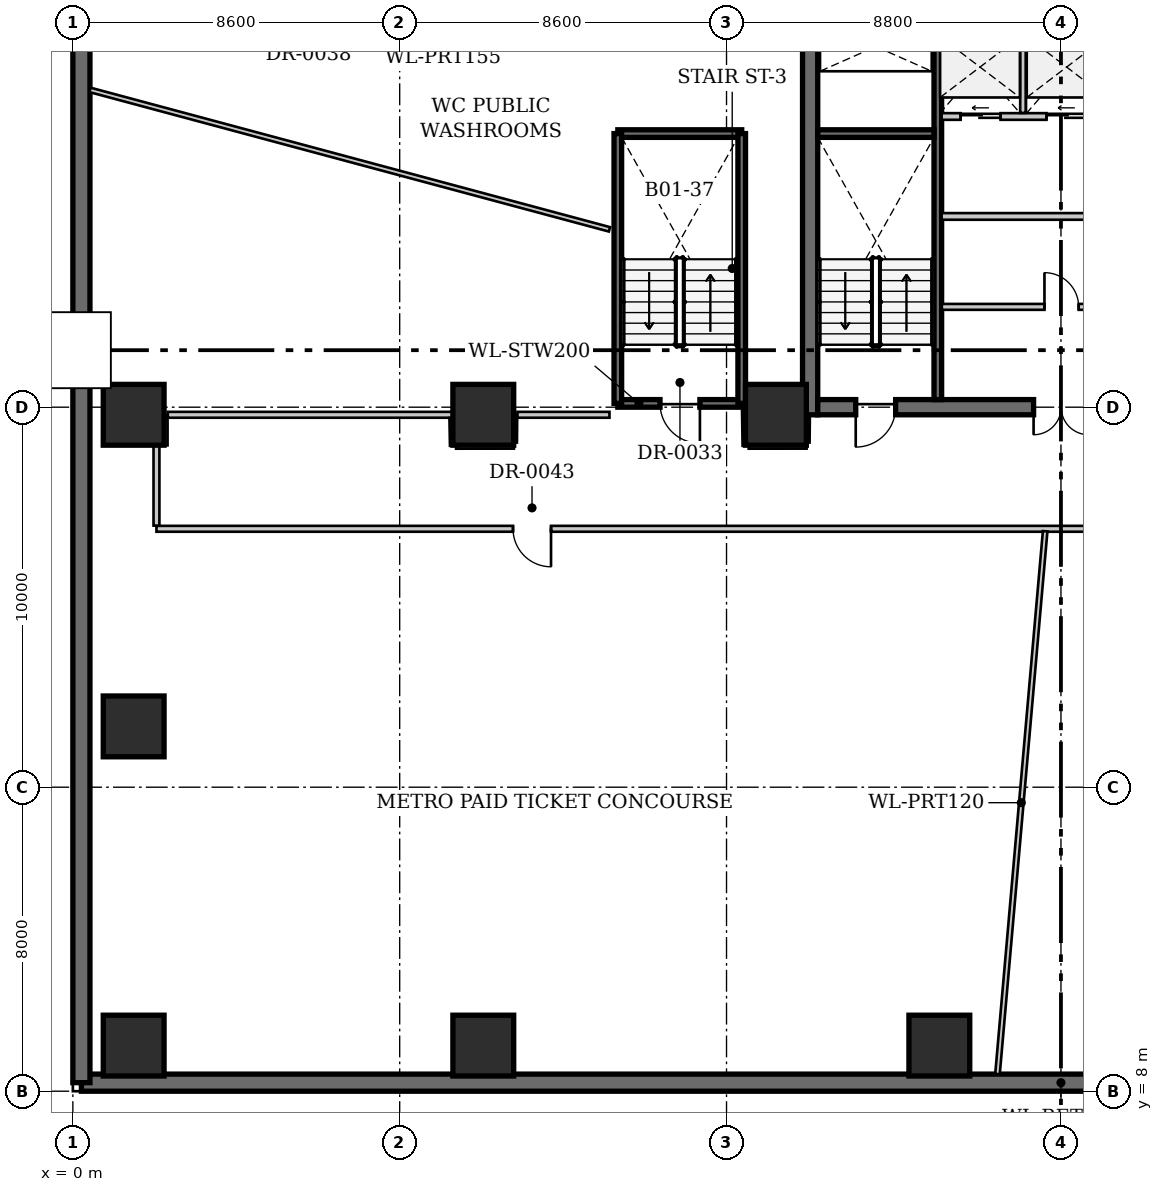
"""IFC4 building model, lengths in metres.
Left out: names, types, materials, properties, quantities, classifications, styles, units other than length and angle.
Written with IfcOpenShell. Run it as: python <this file> out.ifc"""

import sys

from ifc_helpers import new_model, si_unit, direction, frame, frame_2d, origin, origin_2d, place, context, subcontext, project, spatial, rectangle, extrude, source, transform, mapped, element, fill, save


model = new_model("IFC4")
c1 = context("Model", 3, precision=1e-05, world=origin(), true_north=direction((0.0, 1.0)))
c2 = subcontext(c1, "Body", "Model", "MODEL_VIEW")
j1 = project(units=[si_unit("LENGTHUNIT", "METRE"), si_unit("PLANEANGLEUNIT", "RADIAN")], contexts=[c1])
p1 = place(None, origin())
s1 = spatial("IfcSite", under=j1, at=p1, CompositionType="ELEMENT")
p2 = place(p1, origin())
s2 = spatial("IfcBuilding", under=s1, at=p2, CompositionType="ELEMENT")
p3 = place(p2, frame((0.0, 0.0, -5.8)))
s3 = spatial("IfcBuildingStorey", under=s2, at=p3, CompositionType="ELEMENT", Elevation=-5.8)
for number, where, z_axis, x_axis in (
    (1, (1.6, 9.2, 0.0), (0.0, 0.0, 1.0), (1.0, 0.0, 0.0)),
    (2, (1.6, 17.6, 0.0), (0.0, 0.0, 1.0), (1.0, 0.0, 0.0)),
    (3, (1.6, 25.8, 0.0), (0.0, 0.0, 1.0), (1.0, 0.0, 0.0)),
    (4, (10.8, 9.2, 0.0), (0.0, 0.0, 1.0), (1.0, 0.0, 0.0)),
    (5, (22.8, 9.2, 0.0), (0.0, 0.0, 1.0), (1.0, 0.0, 0.0)),
    (6, (10.8, 25.8, 0.0), (0.0, 0.0, 1.0), (1.0, 0.0, 0.0)),
    (7, (18.5, 25.8, 0.0), (0.0, 0.0, 1.0), (1.0, 0.0, 0.0)),
):
    element("IfcColumn", number, at=place(p3, frame(where, z_axis=z_axis, x_axis=x_axis)), inside=s3, PredefinedType="COLUMN", context=c2, shape_type="SweptSolid", body=[
        extrude(rectangle(XDim=1.6, YDim=1.6, at=origin_2d()), origin(), (0.0, 0.0, 1.0), 5.45),
    ])
p4 = place(p3, frame((51.775, 8.225, 0.0), z_axis=(0.0, 0.0, 1.0), x_axis=(-1.0, 0.0, 0.0)))
e8 = element("IfcWall", 8, at=p4, inside=s3, PredefinedType="SHEAR", context=c2, shape_type="SweptSolid", body=[
    extrude(rectangle(XDim=51.55, YDim=0.45, at=frame_2d((25.775, 0.0))), origin(), (0.0, 0.0, 1.0), 5.8),
])
p5 = place(p3, frame((0.225, 8.225, 0.0), z_axis=(0.0, 0.0, 1.0), x_axis=(0.0, 1.0, 0.0)))
e9 = element("IfcWall", 9, at=p5, inside=s3, PredefinedType="SHEAR", context=c2, shape_type="SweptSolid", body=[
    extrude(rectangle(XDim=39.55, YDim=0.45, at=frame_2d((19.775, 0.0))), origin(), (0.0, 0.0, 1.0), 5.8),
])
p6 = place(p3, frame((19.4, 25.8, 0.0), z_axis=(0.0, 0.0, 1.0), x_axis=(0.0, 1.0, 0.0)))
e10 = element("IfcWall", 10, at=p6, inside=s3, PredefinedType="SHEAR", context=c2, shape_type="SweptSolid", body=[
    extrude(rectangle(XDim=10.8, YDim=0.4, at=frame_2d((5.4, 0.0))), origin(), (0.0, 0.0, 1.0), 5.8),
])
p7 = place(p3, frame((32.4, 26.0, 0.0), z_axis=(0.0, 0.0, 1.0), x_axis=(-1.0, 0.0, 0.0)))
e11 = element("IfcWall", 11, at=p7, inside=s3, PredefinedType="SHEAR", context=c2, shape_type="SweptSolid", body=[
    extrude(rectangle(XDim=12.8, YDim=0.4, at=frame_2d((6.4, 0.0))), origin(), (0.0, 0.0, 1.0), 5.8),
])
p8 = place(p7, frame((10.75, 0.0, 0.0)))
e12 = element("IfcOpeningElement", 12, at=p8, cuts=e11, PredefinedType="OPENING", context=c2, shape_type="SweptSolid", body=[
    extrude(rectangle(XDim=1.05, YDim=2.15, at=frame_2d((0.525, 1.075))), frame((0.0, 0.21, 0.0), z_axis=(0.0, -1.0, 0.0), x_axis=(1.0, 0.0, 0.0)), (0.0, 0.0, 1.0), 0.42),
])
p9 = place(p7, frame((5.67, 0.0, 0.0)))
e13 = element("IfcOpeningElement", 13, at=p9, cuts=e11, PredefinedType="OPENING", context=c2, shape_type="SweptSolid", body=[
    extrude(rectangle(XDim=1.45, YDim=2.2, at=frame_2d((0.725, 1.1))), frame((0.0, 0.21, 0.0), z_axis=(0.0, -1.0, 0.0), x_axis=(1.0, 0.0, 0.0)), (0.0, 0.0, 1.0), 0.42),
])
p10 = place(p3, frame((22.76, 26.2, 0.0), z_axis=(0.0, 0.0, 1.0), x_axis=(0.0, 1.0, 0.0)))
e14 = element("IfcWall", 14, at=p10, inside=s3, PredefinedType="SHEAR", context=c2, shape_type="SweptSolid", body=[
    extrude(rectangle(XDim=10.0, YDim=0.2, at=frame_2d((5.0, 0.0))), origin(), (0.0, 0.0, 1.0), 5.8),
])
p11 = place(p3, frame((19.6, 33.2, 0.0), z_axis=(0.0, 0.0, 1.0), x_axis=(1.0, 0.0, 0.0)))
e15 = element("IfcWall", 15, at=p11, inside=s3, PredefinedType="SHEAR", context=c2, shape_type="SweptSolid", body=[
    extrude(rectangle(XDim=3.06, YDim=0.2, at=frame_2d((1.53, 0.0))), origin(), (0.0, 0.0, 1.0), 5.8),
])
p12 = place(p3, frame((22.86, 33.65, 0.0), z_axis=(0.0, 0.0, 1.0), x_axis=(1.0, 0.0, 0.0)))
e16 = element("IfcWall", 16, at=p12, inside=s3, PredefinedType="SOLIDWALL", context=c2, shape_type="SweptSolid", body=[
    extrude(rectangle(XDim=6.28, YDim=0.175, at=frame_2d((3.14, 0.0))), origin(), (0.0, 0.0, 1.0), 5.45),
])
p13 = place(p12, frame((0.5, 0.0, 0.0)))
e17 = element("IfcOpeningElement", 17, at=p13, cuts=e16, PredefinedType="OPENING", context=c2, shape_type="SweptSolid", body=[
    extrude(rectangle(XDim=1.05, YDim=2.15, at=frame_2d((0.525, 1.075))), frame((0.0, 0.098, 0.0), z_axis=(0.0, -1.0, 0.0), x_axis=(1.0, 0.0, 0.0)), (0.0, 0.0, 1.0), 0.195),
])
p14 = place(p12, frame((2.76, 0.0, 0.0)))
e18 = element("IfcOpeningElement", 18, at=p14, cuts=e16, PredefinedType="OPENING", context=c2, shape_type="SweptSolid", body=[
    extrude(rectangle(XDim=1.05, YDim=2.15, at=frame_2d((0.525, 1.075))), frame((0.0, 0.098, 0.0), z_axis=(0.0, -1.0, 0.0), x_axis=(1.0, 0.0, 0.0)), (0.0, 0.0, 1.0), 0.195),
])
p15 = place(p12, frame((4.9, 0.0, 0.0)))
e19 = element("IfcOpeningElement", 19, at=p15, cuts=e16, PredefinedType="OPENING", context=c2, shape_type="SweptSolid", body=[
    extrude(rectangle(XDim=1.05, YDim=2.15, at=frame_2d((0.525, 1.075))), frame((0.0, 0.098, 0.0), z_axis=(0.0, -1.0, 0.0), x_axis=(1.0, 0.0, 0.0)), (0.0, 0.0, 1.0), 0.195),
])
p16 = place(p3, frame((25.0, 33.743, 0.0), z_axis=(0.0, 0.0, 1.0), x_axis=(0.0, 1.0, 0.0)))
e20 = element("IfcWall", 20, at=p16, inside=s3, PredefinedType="SOLIDWALL", context=c2, shape_type="SweptSolid", body=[
    extrude(rectangle(XDim=2.457, YDim=0.145, at=frame_2d((1.228, 0.0))), origin(), (0.0, 0.0, 1.0), 5.45),
])
p17 = place(p3, frame((22.86, 31.02, 0.0), z_axis=(0.0, 0.0, 1.0), x_axis=(1.0, 0.0, 0.0)))
e21 = element("IfcWall", 21, at=p17, inside=s3, PredefinedType="SOLIDWALL", context=c2, shape_type="SweptSolid", body=[
    extrude(rectangle(XDim=6.28, YDim=0.175, at=frame_2d((3.14, 0.0))), origin(), (0.0, 0.0, 1.0), 5.45),
])
p18 = place(p3, frame((22.866, 28.64, 0.0), z_axis=(0.0, 0.0, 1.0), x_axis=(1.0, 0.0, 0.0)))
e22 = element("IfcWall", 22, at=p18, inside=s3, PredefinedType="PARTITIONING", context=c2, shape_type="SweptSolid", body=[
    extrude(rectangle(XDim=6.268, YDim=0.155, at=frame_2d((3.134, 0.0))), origin(), (0.0, 0.0, 1.0), 5.45),
])
p19 = place(p18, frame((2.7, 0.0, 0.0)))
e23 = element("IfcOpeningElement", 23, at=p19, cuts=e22, PredefinedType="OPENING", context=c2, shape_type="SweptSolid", body=[
    extrude(rectangle(XDim=0.9, YDim=2.1, at=frame_2d((0.45, 1.05))), frame((0.0, 0.087, 0.0), z_axis=(0.0, -1.0, 0.0), x_axis=(1.0, 0.0, 0.0)), (0.0, 0.0, 1.0), 0.175),
])
p20 = place(p3, frame((17.6, 26.1, 0.0), z_axis=(0.0, 0.0, 1.0), x_axis=(-1.0, 0.0, 0.0)))
e24 = element("IfcWall", 24, at=p20, inside=s3, PredefinedType="SHEAR", context=c2, shape_type="SweptSolid", body=[
    extrude(rectangle(XDim=3.26, YDim=0.2, at=frame_2d((1.63, 0.0))), origin(), (0.0, 0.0, 1.0), 5.8),
])
p21 = place(p20, frame((1.1, 0.0, 0.0)))
e25 = element("IfcOpeningElement", 25, at=p21, cuts=e24, PredefinedType="OPENING", context=c2, shape_type="SweptSolid", body=[
    extrude(rectangle(XDim=1.05, YDim=2.15, at=frame_2d((0.525, 1.075))), frame((0.0, 0.11, 0.0), z_axis=(0.0, -1.0, 0.0), x_axis=(1.0, 0.0, 0.0)), (0.0, 0.0, 1.0), 0.22),
])
p22 = place(p3, frame((14.34, 33.2, 0.0), z_axis=(0.0, 0.0, 1.0), x_axis=(1.0, 0.0, 0.0)))
e26 = element("IfcWall", 26, at=p22, inside=s3, PredefinedType="SHEAR", context=c2, shape_type="SweptSolid", body=[
    extrude(rectangle(XDim=3.26, YDim=0.2, at=frame_2d((1.63, 0.0))), origin(), (0.0, 0.0, 1.0), 5.8),
])
for number, where, z_axis, x_axis in (
    (27, (14.34, 26.1, 0.0), (0.0, 0.0, 1.0), (0.0, 1.0, 0.0)),
    (28, (17.6, 26.1, 0.0), (0.0, 0.0, 1.0), (0.0, 1.0, 0.0)),
):
    element("IfcWall", number, at=place(p3, frame(where, z_axis=z_axis, x_axis=x_axis)), inside=s3, PredefinedType="SHEAR", context=c2, shape_type="SweptSolid", body=[
        extrude(rectangle(XDim=7.1, YDim=0.2, at=frame_2d((3.55, 0.0))), origin(), (0.0, 0.0, 1.0), 5.8),
    ])
p23 = place(p3, frame((46.0, 22.8, 0.0), z_axis=(0.0, 0.0, 1.0), x_axis=(-1.0, 0.0, 0.0)))
e29 = element("IfcWall", 29, at=p23, inside=s3, PredefinedType="PARTITIONING", context=c2, shape_type="SweptSolid", body=[
    extrude(rectangle(XDim=43.8, YDim=0.155, at=frame_2d((21.9, 0.0))), origin(), (0.0, 0.0, 1.0), 5.45),
])
p24 = place(p23, frame((33.418, 0.0, 0.0)))
e30 = element("IfcOpeningElement", 30, at=p24, cuts=e29, PredefinedType="OPENING", context=c2, shape_type="SweptSolid", body=[
    extrude(rectangle(XDim=1.0, YDim=2.15, at=frame_2d((0.5, 1.075))), frame((0.0, 0.087, 0.0), z_axis=(0.0, -1.0, 0.0), x_axis=(1.0, 0.0, 0.0)), (0.0, 0.0, 1.0), 0.175),
])
p25 = place(p23, frame((16.866, 0.0, 0.0)))
e31 = element("IfcOpeningElement", 31, at=p25, cuts=e29, PredefinedType="OPENING", context=c2, shape_type="SweptSolid", body=[
    extrude(rectangle(XDim=1.0, YDim=2.15, at=frame_2d((0.5, 1.075))), frame((0.0, 0.087, 0.0), z_axis=(0.0, -1.0, 0.0), x_axis=(1.0, 0.0, 0.0)), (0.0, 0.0, 1.0), 0.175),
])
p26 = place(p23, frame((6.794, 0.0, 0.0)))
e32 = element("IfcOpeningElement", 32, at=p26, cuts=e29, PredefinedType="OPENING", context=c2, shape_type="SweptSolid", body=[
    extrude(rectangle(XDim=0.95, YDim=2.15, at=frame_2d((0.475, 1.075))), frame((0.0, 0.087, 0.0), z_axis=(0.0, -1.0, 0.0), x_axis=(1.0, 0.0, 0.0)), (0.0, 0.0, 1.0), 0.175),
])
p27 = place(p3, frame((2.2, 22.884, 0.0), z_axis=(0.0, 0.0, 1.0), x_axis=(0.0, 1.0, 0.0)))
e33 = element("IfcWall", 33, at=p27, inside=s3, PredefinedType="PARTITIONING", context=c2, shape_type="SweptSolid", body=[
    extrude(rectangle(XDim=2.102, YDim=0.155, at=frame_2d((1.051, 0.0))), origin(), (0.0, 0.0, 1.0), 5.45),
])
p28 = place(p3, frame((2.414, 24.996, 0.0), z_axis=(0.0, 0.0, 1.0), x_axis=(0.000910470032, 0.999999585522, 0.0)))
e34 = element("IfcWall", 34, at=p28, inside=s3, PredefinedType="PARTITIONING", context=c2, shape_type="SweptSolid", body=[
    extrude(rectangle(XDim=0.804, YDim=0.155, at=frame_2d((0.402, 0.0))), origin(), (0.0, 0.0, 1.0), 5.45),
])
p29 = place(p3, frame((2.499, 25.8, 0.0), z_axis=(0.0, 0.0, 1.0), x_axis=(1.0, 0.0, 0.0)))
e35 = element("IfcWall", 35, at=p29, inside=s3, PredefinedType="PARTITIONING", context=c2, shape_type="SweptSolid", body=[
    extrude(rectangle(XDim=7.487, YDim=0.155, at=frame_2d((3.743, 0.0))), origin(), (0.0, 0.0, 1.0), 4.225),
])
p30 = place(p3, frame((9.987, 25.717, 0.0), z_axis=(0.0, 0.0, 1.0), x_axis=(0.01835471782, -0.999831537977, 0.0)))
e36 = element("IfcWall", 36, at=p30, inside=s3, PredefinedType="PARTITIONING", context=c2, shape_type="SweptSolid", body=[
    extrude(rectangle(XDim=0.732, YDim=0.155, at=frame_2d((0.366, 0.0))), origin(), (0.0, 0.0, 1.0), 5.45),
])
p31 = place(p3, frame((10.083, 24.985, 0.0), z_axis=(0.0, 0.0, 1.0), x_axis=(0.99999937099, 0.00112161442, 0.0)))
e37 = element("IfcWall", 37, at=p31, inside=s3, PredefinedType="PARTITIONING", context=c2, shape_type="SweptSolid", body=[
    extrude(rectangle(XDim=1.524, YDim=0.155, at=frame_2d((0.762, 0.0))), origin(), (0.0, 0.0, 1.0), 5.45),
])
p32 = place(p3, frame((11.608, 25.07, 0.0), z_axis=(0.0, 0.0, 1.0), x_axis=(0.009701784932, 0.999952936577, 0.0)))
e38 = element("IfcWall", 38, at=p32, inside=s3, PredefinedType="PARTITIONING", context=c2, shape_type="SweptSolid", body=[
    extrude(rectangle(XDim=0.73, YDim=0.155, at=frame_2d((0.365, 0.0))), origin(), (0.0, 0.0, 1.0), 5.45),
])
p33 = place(p3, frame((11.698, 25.8, 0.0), z_axis=(0.0, 0.0, 1.0), x_axis=(1.0, 0.0, 0.0)))
e39 = element("IfcWall", 39, at=p33, inside=s3, PredefinedType="PARTITIONING", context=c2, shape_type="SweptSolid", body=[
    extrude(rectangle(XDim=2.422, YDim=0.155, at=frame_2d((1.211, 0.0))), origin(), (0.0, 0.0, 1.0), 5.45),
])
p34 = place(p3, frame((17.685, 25.95, 0.0), z_axis=(0.0, 0.0, 1.0), x_axis=(0.01543338431, -0.999880898232, 0.0)))
e40 = element("IfcWall", 40, at=p34, inside=s3, PredefinedType="PARTITIONING", context=c2, shape_type="SweptSolid", body=[
    extrude(rectangle(XDim=0.965, YDim=0.155, at=frame_2d((0.482, 0.0))), origin(), (0.0, 0.0, 1.0), 5.45),
])
p35 = place(p3, frame((17.783, 24.985, 0.0), z_axis=(0.0, 0.0, 1.0), x_axis=(0.99999937099, 0.00112161442, 0.0)))
e41 = element("IfcWall", 41, at=p35, inside=s3, PredefinedType="PARTITIONING", context=c2, shape_type="SweptSolid", body=[
    extrude(rectangle(XDim=1.524, YDim=0.155, at=frame_2d((0.762, 0.0))), origin(), (0.0, 0.0, 1.0), 5.45),
])
p36 = place(p3, frame((19.308, 25.07, 0.0), z_axis=(0.0, 0.0, 1.0), x_axis=(0.010362137944, 0.999946311607, 0.0)))
e42 = element("IfcWall", 42, at=p36, inside=s3, PredefinedType="PARTITIONING", context=c2, shape_type="SweptSolid", body=[
    extrude(rectangle(XDim=0.66, YDim=0.155, at=frame_2d((0.33, 0.0))), origin(), (0.0, 0.0, 1.0), 5.45),
])
p37 = place(p3, frame((25.584, 22.735, 0.0), z_axis=(0.0, 0.0, 1.0), x_axis=(-0.087457552049, -0.99616824713, 0.0)))
e43 = element("IfcWall", 43, at=p37, inside=s3, PredefinedType="PARTITIONING", context=c2, shape_type="SweptSolid", body=[
    extrude(rectangle(XDim=14.34, YDim=0.12, at=frame_2d((7.17, 0.0))), origin(), (0.0, 0.0, 1.0), 5.45),
])
p38 = place(p3, frame((0.45, 34.35, 0.0), z_axis=(0.0, 0.0, 1.0), x_axis=(0.965797547466, -0.259297314505, 0.0)))
e44 = element("IfcWall", 44, at=p38, inside=s3, PredefinedType="PARTITIONING", context=c2, shape_type="SweptSolid", body=[
    extrude(rectangle(XDim=14.154, YDim=0.12, at=frame_2d((7.077, 0.0))), origin(), (0.0, 0.0, 1.0), 5.012),
])
m1 = source(origin(), c2, "Body", "SweptSolid", [
    extrude(rectangle(XDim=1.05, YDim=2.15, at=frame_2d((0.525, 1.075))), frame((0.0, 0.025, 0.0), z_axis=(0.0, -1.0, 0.0), x_axis=(1.0, 0.0, 0.0)), (0.0, 0.0, 1.0), 0.05),
])
p39 = place(p8, origin())
e45 = element("IfcDoor", 45, at=p39, inside=s3, OperationType="SINGLE_SWING_RIGHT", PredefinedType="DOOR", context=c2, shape_type="MappedRepresentation", body=[
    mapped(m1, transform((0.0, 0.0, 0.0), x_axis=(1.0, 0.0, 0.0), y_axis=(0.0, 1.0, 0.0), z_axis=(0.0, 0.0, 1.0), scale=1.0)),
])
fill(e12, e45)
m2 = source(origin(), c2, "Body", "SweptSolid", [
    extrude(rectangle(XDim=1.45, YDim=2.2, at=frame_2d((0.725, 1.1))), frame((0.0, 0.025, 0.0), z_axis=(0.0, -1.0, 0.0), x_axis=(1.0, 0.0, 0.0)), (0.0, 0.0, 1.0), 0.05),
])
p40 = place(p9, origin())
e46 = element("IfcDoor", 46, at=p40, inside=s3, OperationType="DOUBLE_DOOR_SINGLE_SWING", PredefinedType="DOOR", context=c2, shape_type="MappedRepresentation", body=[
    mapped(m2, transform((0.0, 0.0, 0.0), x_axis=(1.0, 0.0, 0.0), y_axis=(0.0, 1.0, 0.0), z_axis=(0.0, 0.0, 1.0), scale=1.0)),
])
fill(e13, e46)
m3 = source(origin(), c2, "Body", "SweptSolid", [
    extrude(rectangle(XDim=1.05, YDim=2.15, at=frame_2d((0.525, 1.075))), frame((0.0, 0.025, 0.0), z_axis=(0.0, -1.0, 0.0), x_axis=(1.0, 0.0, 0.0)), (0.0, 0.0, 1.0), 0.05),
])
p41 = place(p13, origin())
e47 = element("IfcDoor", 47, at=p41, inside=s3, OperationType="SLIDING_TO_LEFT", PredefinedType="DOOR", context=c2, shape_type="MappedRepresentation", body=[
    mapped(m3, transform((0.0, 0.0, 0.0), x_axis=(1.0, 0.0, 0.0), y_axis=(0.0, 1.0, 0.0), z_axis=(0.0, 0.0, 1.0), scale=1.0)),
])
fill(e17, e47)
p42 = place(p14, origin())
e48 = element("IfcDoor", 48, at=p42, inside=s3, OperationType="SLIDING_TO_LEFT", PredefinedType="DOOR", context=c2, shape_type="MappedRepresentation", body=[
    mapped(m3, transform((0.0, 0.0, 0.0), x_axis=(1.0, 0.0, 0.0), y_axis=(0.0, 1.0, 0.0), z_axis=(0.0, 0.0, 1.0), scale=1.0)),
])
fill(e18, e48)
m4 = source(origin(), c2, "Body", "SweptSolid", [
    extrude(rectangle(XDim=0.9, YDim=2.1, at=frame_2d((0.45, 1.05))), frame((0.0, 0.025, 0.0), z_axis=(0.0, -1.0, 0.0), x_axis=(1.0, 0.0, 0.0)), (0.0, 0.0, 1.0), 0.05),
])
p43 = place(p19, origin())
e49 = element("IfcDoor", 49, at=p43, inside=s3, OperationType="SINGLE_SWING_LEFT", PredefinedType="DOOR", context=c2, shape_type="MappedRepresentation", body=[
    mapped(m4, transform((0.0, 0.0, 0.0), x_axis=(1.0, 0.0, 0.0), y_axis=(0.0, 1.0, 0.0), z_axis=(0.0, 0.0, 1.0), scale=1.0)),
])
fill(e23, e49)
p44 = place(p21, origin())
e50 = element("IfcDoor", 50, at=p44, inside=s3, OperationType="SINGLE_SWING_LEFT", PredefinedType="DOOR", context=c2, shape_type="MappedRepresentation", body=[
    mapped(m1, transform((0.0, 0.0, 0.0), x_axis=(1.0, 0.0, 0.0), y_axis=(0.0, 1.0, 0.0), z_axis=(0.0, 0.0, 1.0), scale=1.0)),
])
fill(e25, e50)
m5 = source(origin(), c2, "Body", "SweptSolid", [
    extrude(rectangle(XDim=1.0, YDim=2.15, at=frame_2d((0.5, 1.075))), frame((0.0, 0.025, 0.0), z_axis=(0.0, -1.0, 0.0), x_axis=(1.0, 0.0, 0.0)), (0.0, 0.0, 1.0), 0.05),
])
p45 = place(p24, origin())
e51 = element("IfcDoor", 51, at=p45, inside=s3, OperationType="SINGLE_SWING_LEFT", PredefinedType="DOOR", context=c2, shape_type="MappedRepresentation", body=[
    mapped(m5, transform((0.0, 0.0, 0.0), x_axis=(1.0, 0.0, 0.0), y_axis=(0.0, 1.0, 0.0), z_axis=(0.0, 0.0, 1.0), scale=1.0)),
])
fill(e30, e51)
save(model, sys.argv[1])
